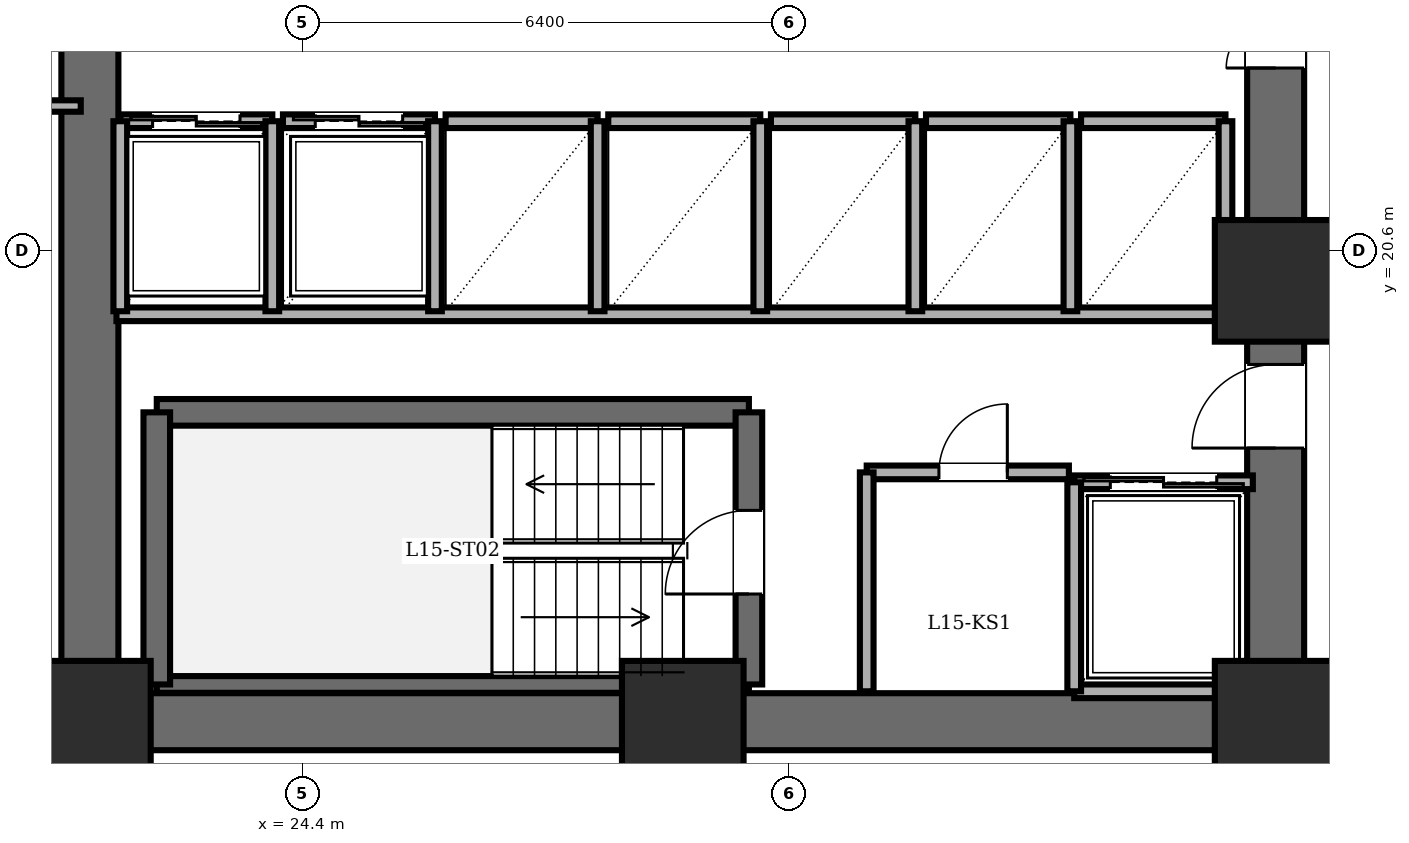
"""IFC4 building model, lengths in metres.
Left out: names, types, materials, properties, quantities, classifications, styles, units other than length and angle.
Written with IfcOpenShell. Run it as: python <this file> out.ifc"""

import sys

from ifc_helpers import new_model, si_unit, direction, frame, frame_2d, origin, origin_2d, place, context, subcontext, project, spatial, rectangle, extrude, element, fill, save


model = new_model("IFC4")
c1 = context("Model", 3, precision=1e-05, world=origin(), true_north=direction((0.0, 1.0)))
c2 = subcontext(c1, "Body", "Model", "MODEL_VIEW")
j1 = project(units=[si_unit("LENGTHUNIT", "METRE"), si_unit("PLANEANGLEUNIT", "RADIAN")], contexts=[c1])
p1 = place(None, origin())
s1 = spatial("IfcSite", under=j1, at=p1, CompositionType="ELEMENT")
p2 = place(p1, origin())
s2 = spatial("IfcBuilding", under=s1, at=p2, CompositionType="ELEMENT")
p3 = place(p2, frame((0.0, 0.0, 57.6)))
s3 = spatial("IfcBuildingStorey", under=s2, at=p3, CompositionType="ELEMENT", Elevation=57.6)
for number, where, z_axis, x_axis in (
    (1, (21.6, 14.4, 0.0), (0.0, 0.0, 1.0), (1.0, 0.0, 0.0)),
    (2, (29.4, 14.4, 0.0), (0.0, 0.0, 1.0), (1.0, 0.0, 0.0)),
    (3, (37.2, 14.4, 0.0), (0.0, 0.0, 1.0), (1.0, 0.0, 0.0)),
    (4, (37.2, 20.2, 0.0), (0.0, 0.0, 1.0), (1.0, 0.0, 0.0)),
):
    element("IfcColumn", number, at=place(p3, frame(where, z_axis=z_axis, x_axis=x_axis)), inside=s3, PredefinedType="COLUMN", context=c2, shape_type="SweptSolid", body=[
        extrude(rectangle(XDim=1.6, YDim=1.6, at=origin_2d()), origin(), (0.0, 0.0, 1.0), 3.6),
    ])
p4 = place(p3, frame((21.6, 14.4, 0.0), z_axis=(0.0, 0.0, 1.0), x_axis=(0.0, 1.0, 0.0)))
e5 = element("IfcWall", 5, at=p4, inside=s3, PredefinedType="SHEAR", context=c2, shape_type="SweptSolid", body=[
    extrude(rectangle(XDim=19.2, YDim=0.75, at=frame_2d((9.6, 0.0))), origin(), (0.0, 0.0, 1.0), 3.4),
])
p5 = place(p3, frame((37.2, 14.4, 0.0), z_axis=(0.0, 0.0, 1.0), x_axis=(-1.0, 0.0, 0.0)))
e6 = element("IfcWall", 6, at=p5, inside=s3, PredefinedType="SHEAR", context=c2, shape_type="SweptSolid", body=[
    extrude(rectangle(XDim=15.6, YDim=0.75, at=frame_2d((7.8, 0.0))), origin(), (0.0, 0.0, 1.0), 3.4),
])
p6 = place(p3, frame((37.2, 14.4, 0.0), z_axis=(0.0, 0.0, 1.0), x_axis=(0.0, 1.0, 0.0)))
e7 = element("IfcWall", 7, at=p6, inside=s3, PredefinedType="SHEAR", context=c2, shape_type="SweptSolid", body=[
    extrude(rectangle(XDim=19.2, YDim=0.75, at=frame_2d((9.6, 0.0))), origin(), (0.0, 0.0, 1.0), 3.4),
])
p7 = place(p6, frame((15.8, 0.0, 0.0)))
e8 = element("IfcOpeningElement", 8, at=p7, cuts=e7, PredefinedType="OPENING", context=c2, shape_type="SweptSolid", body=[
    extrude(rectangle(XDim=1.15, YDim=2.15, at=frame_2d((0.575, 1.075))), frame((0.0, 0.385, 0.0), z_axis=(0.0, -1.0, 0.0), x_axis=(1.0, 0.0, 0.0)), (0.0, 0.0, 1.0), 0.77),
])
p8 = place(p6, frame((3.6, 0.0, 0.0)))
e9 = element("IfcOpeningElement", 9, at=p8, cuts=e7, PredefinedType="OPENING", context=c2, shape_type="SweptSolid", body=[
    extrude(rectangle(XDim=1.1, YDim=2.15, at=frame_2d((0.55, 1.075))), frame((0.0, 0.385, 0.0), z_axis=(0.0, -1.0, 0.0), x_axis=(1.0, 0.0, 0.0)), (0.0, 0.0, 1.0), 0.77),
])
p9 = place(p6, frame((8.6, 0.0, 0.0)))
e10 = element("IfcOpeningElement", 10, at=p9, cuts=e7, PredefinedType="OPENING", context=c2, shape_type="SweptSolid", body=[
    extrude(rectangle(XDim=1.3, YDim=2.2, at=frame_2d((0.65, 1.1))), frame((0.0, 0.385, 0.0), z_axis=(0.0, -1.0, 0.0), x_axis=(1.0, 0.0, 0.0)), (0.0, 0.0, 1.0), 0.77),
])
p10 = place(p3, frame((22.48, 18.47, 0.0), z_axis=(0.0, 0.0, 1.0), x_axis=(1.0, 0.0, 0.0)))
e11 = element("IfcWall", 11, at=p10, inside=s3, PredefinedType="SOLIDWALL", context=c2, shape_type="SweptSolid", body=[
    extrude(rectangle(XDim=7.79, YDim=0.35, at=frame_2d((3.895, 0.0))), origin(), (0.0, 0.0, 1.0), 3.4),
])
p11 = place(p3, frame((22.48, 14.89, 0.0), z_axis=(0.0, 0.0, 1.0), x_axis=(1.0, 0.0, 0.0)))
e12 = element("IfcWall", 12, at=p11, inside=s3, PredefinedType="PARTITIONING", context=c2, shape_type="SweptSolid", body=[
    extrude(rectangle(XDim=7.79, YDim=0.22, at=frame_2d((3.895, 0.0))), origin(), (0.0, 0.0, 1.0), 3.4),
])
p12 = place(p3, frame((22.48, 14.89, 0.0), z_axis=(0.0, 0.0, 1.0), x_axis=(0.0, 1.0, 0.0)))
e13 = element("IfcWall", 13, at=p12, inside=s3, PredefinedType="SOLIDWALL", context=c2, shape_type="SweptSolid", body=[
    extrude(rectangle(XDim=3.58, YDim=0.35, at=frame_2d((1.79, 0.0))), origin(), (0.0, 0.0, 1.0), 3.4),
])
p13 = place(p3, frame((30.27, 14.89, 0.0), z_axis=(0.0, 0.0, 1.0), x_axis=(0.0, 1.0, 0.0)))
e14 = element("IfcWall", 14, at=p13, inside=s3, PredefinedType="SOLIDWALL", context=c2, shape_type="SweptSolid", body=[
    extrude(rectangle(XDim=3.58, YDim=0.35, at=frame_2d((1.79, 0.0))), origin(), (0.0, 0.0, 1.0), 3.4),
])
p14 = place(p13, frame((1.19, 0.0, 0.0)))
e15 = element("IfcOpeningElement", 15, at=p14, cuts=e14, PredefinedType="OPENING", context=c2, shape_type="SweptSolid", body=[
    extrude(rectangle(XDim=1.1, YDim=2.15, at=frame_2d((0.55, 1.075))), frame((0.0, 0.185, 0.0), z_axis=(0.0, -1.0, 0.0), x_axis=(1.0, 0.0, 0.0)), (0.0, 0.0, 1.0), 0.37),
])
p15 = place(p3, frame((21.95, 19.76, 0.0), z_axis=(0.0, 0.0, 1.0), x_axis=(1.0, 0.0, 0.0)))
e16 = element("IfcWall", 16, at=p15, inside=s3, PredefinedType="PARTITIONING", context=c2, shape_type="SweptSolid", body=[
    extrude(rectangle(XDim=14.87, YDim=0.18, at=frame_2d((7.435, 0.0))), origin(), (0.0, 0.0, 1.0), 3.4),
])
p16 = place(p3, frame((31.82, 17.68, 0.0), z_axis=(0.0, 0.0, 1.0), x_axis=(1.0, 0.0, 0.0)))
e17 = element("IfcWall", 17, at=p16, inside=s3, PredefinedType="PARTITIONING", context=c2, shape_type="SweptSolid", body=[
    extrude(rectangle(XDim=2.66, YDim=0.18, at=frame_2d((1.33, 0.0))), origin(), (0.0, 0.0, 1.0), 3.4),
])
p17 = place(p16, frame((0.95, 0.0, 0.0)))
e18 = element("IfcOpeningElement", 18, at=p17, cuts=e17, PredefinedType="OPENING", context=c2, shape_type="SweptSolid", body=[
    extrude(rectangle(XDim=0.9, YDim=2.05, at=frame_2d((0.45, 1.025))), frame((0.0, 0.1, 0.0), z_axis=(0.0, -1.0, 0.0), x_axis=(1.0, 0.0, 0.0)), (0.0, 0.0, 1.0), 0.2),
])
p18 = place(p3, frame((31.82, 14.8, 0.0), z_axis=(0.0, 0.0, 1.0), x_axis=(0.0, 1.0, 0.0)))
e19 = element("IfcWall", 19, at=p18, inside=s3, PredefinedType="PARTITIONING", context=c2, shape_type="SweptSolid", body=[
    extrude(rectangle(XDim=2.88, YDim=0.18, at=frame_2d((1.44, 0.0))), origin(), (0.0, 0.0, 1.0), 3.4),
])
p19 = place(p3, frame((34.55, 17.55, 0.0), z_axis=(0.0, 0.0, 1.0), x_axis=(1.0, 0.0, 0.0)))
e20 = element("IfcWall", 20, at=p19, inside=s3, PredefinedType="PARTITIONING", context=c2, shape_type="SweptSolid", body=[
    extrude(rectangle(XDim=2.35, YDim=0.18, at=frame_2d((1.175, 0.0))), origin(), (0.0, 0.0, 1.0), 3.4),
])
p20 = place(p19, frame((0.475, 0.0, 0.0)))
e21 = element("IfcOpeningElement", 21, at=p20, cuts=e20, PredefinedType="OPENING", context=c2, shape_type="SweptSolid", body=[
    extrude(rectangle(XDim=1.4, YDim=2.3, at=frame_2d((0.7, 1.15))), frame((0.0, 0.1, 0.0), z_axis=(0.0, -1.0, 0.0), x_axis=(1.0, 0.0, 0.0)), (0.0, 0.0, 1.0), 0.2),
])
p21 = place(p3, frame((36.9, 14.8, 0.0), z_axis=(0.0, 0.0, 1.0), x_axis=(-1.0, 0.0, 0.0)))
e22 = element("IfcWall", 22, at=p21, inside=s3, PredefinedType="PARTITIONING", context=c2, shape_type="SweptSolid", body=[
    extrude(rectangle(XDim=2.35, YDim=0.18, at=frame_2d((1.175, 0.0))), origin(), (0.0, 0.0, 1.0), 3.4),
])
p22 = place(p3, frame((34.55, 17.55, 0.0), z_axis=(0.0, 0.0, 1.0), x_axis=(0.0, -1.0, 0.0)))
e23 = element("IfcWall", 23, at=p22, inside=s3, PredefinedType="PARTITIONING", context=c2, shape_type="SweptSolid", body=[
    extrude(rectangle(XDim=2.75, YDim=0.18, at=frame_2d((1.375, 0.0))), origin(), (0.0, 0.0, 1.0), 3.4),
])
p23 = place(p3, frame((22.0, 22.3, 0.0), z_axis=(0.0, 0.0, 1.0), x_axis=(1.0, 0.0, 0.0)))
e24 = element("IfcWall", 24, at=p23, inside=s3, PredefinedType="PARTITIONING", context=c2, shape_type="SweptSolid", body=[
    extrude(rectangle(XDim=2.0, YDim=0.18, at=frame_2d((1.0, 0.0))), origin(), (0.0, 0.0, 1.0), 3.4),
])
p24 = place(p23, frame((0.425, 0.0, 0.0)))
e25 = element("IfcOpeningElement", 25, at=p24, cuts=e24, PredefinedType="OPENING", context=c2, shape_type="SweptSolid", body=[
    extrude(rectangle(XDim=1.15, YDim=2.2, at=frame_2d((0.575, 1.1))), frame((0.0, 0.1, 0.0), z_axis=(0.0, -1.0, 0.0), x_axis=(1.0, 0.0, 0.0)), (0.0, 0.0, 1.0), 0.2),
])
for number, where, z_axis, x_axis in (
    (26, (24.0, 19.8, 0.0), (0.0, 0.0, 1.0), (0.0, 1.0, 0.0)),
    (27, (22.0, 22.3, 0.0), (0.0, 0.0, 1.0), (0.0, -1.0, 0.0)),
):
    element("IfcWall", number, at=place(p3, frame(where, z_axis=z_axis, x_axis=x_axis)), inside=s3, PredefinedType="PARTITIONING", context=c2, shape_type="SweptSolid", body=[
        extrude(rectangle(XDim=2.5, YDim=0.18, at=frame_2d((1.25, 0.0))), origin(), (0.0, 0.0, 1.0), 3.4),
    ])
p25 = place(p3, frame((24.14, 22.3, 0.0), z_axis=(0.0, 0.0, 1.0), x_axis=(1.0, 0.0, 0.0)))
e28 = element("IfcWall", 28, at=p25, inside=s3, PredefinedType="PARTITIONING", context=c2, shape_type="SweptSolid", body=[
    extrude(rectangle(XDim=2.0, YDim=0.18, at=frame_2d((1.0, 0.0))), origin(), (0.0, 0.0, 1.0), 3.4),
])
p26 = place(p25, frame((0.425, 0.0, 0.0)))
e29 = element("IfcOpeningElement", 29, at=p26, cuts=e28, PredefinedType="OPENING", context=c2, shape_type="SweptSolid", body=[
    extrude(rectangle(XDim=1.15, YDim=2.2, at=frame_2d((0.575, 1.1))), frame((0.0, 0.1, 0.0), z_axis=(0.0, -1.0, 0.0), x_axis=(1.0, 0.0, 0.0)), (0.0, 0.0, 1.0), 0.2),
])
p27 = place(p3, frame((26.14, 19.8, 0.0), z_axis=(0.0, 0.0, 1.0), x_axis=(0.0, 1.0, 0.0)))
e30 = element("IfcWall", 30, at=p27, inside=s3, PredefinedType="PARTITIONING", context=c2, shape_type="SweptSolid", body=[
    extrude(rectangle(XDim=2.5, YDim=0.18, at=frame_2d((1.25, 0.0))), origin(), (0.0, 0.0, 1.0), 3.4),
])
p28 = place(p3, frame((26.28, 22.3, 0.0), z_axis=(0.0, 0.0, 1.0), x_axis=(1.0, 0.0, 0.0)))
e31 = element("IfcWall", 31, at=p28, inside=s3, PredefinedType="PARTITIONING", context=c2, shape_type="SweptSolid", body=[
    extrude(rectangle(XDim=2.0, YDim=0.18, at=frame_2d((1.0, 0.0))), origin(), (0.0, 0.0, 1.0), 3.4),
])
p29 = place(p3, frame((28.28, 19.8, 0.0), z_axis=(0.0, 0.0, 1.0), x_axis=(0.0, 1.0, 0.0)))
e32 = element("IfcWall", 32, at=p29, inside=s3, PredefinedType="PARTITIONING", context=c2, shape_type="SweptSolid", body=[
    extrude(rectangle(XDim=2.5, YDim=0.18, at=frame_2d((1.25, 0.0))), origin(), (0.0, 0.0, 1.0), 3.4),
])
p30 = place(p3, frame((28.42, 22.3, 0.0), z_axis=(0.0, 0.0, 1.0), x_axis=(1.0, 0.0, 0.0)))
e33 = element("IfcWall", 33, at=p30, inside=s3, PredefinedType="PARTITIONING", context=c2, shape_type="SweptSolid", body=[
    extrude(rectangle(XDim=2.0, YDim=0.18, at=frame_2d((1.0, 0.0))), origin(), (0.0, 0.0, 1.0), 3.4),
])
p31 = place(p3, frame((30.42, 19.8, 0.0), z_axis=(0.0, 0.0, 1.0), x_axis=(0.0, 1.0, 0.0)))
e34 = element("IfcWall", 34, at=p31, inside=s3, PredefinedType="PARTITIONING", context=c2, shape_type="SweptSolid", body=[
    extrude(rectangle(XDim=2.5, YDim=0.18, at=frame_2d((1.25, 0.0))), origin(), (0.0, 0.0, 1.0), 3.4),
])
p32 = place(p3, frame((30.56, 22.3, 0.0), z_axis=(0.0, 0.0, 1.0), x_axis=(1.0, 0.0, 0.0)))
e35 = element("IfcWall", 35, at=p32, inside=s3, PredefinedType="PARTITIONING", context=c2, shape_type="SweptSolid", body=[
    extrude(rectangle(XDim=1.9, YDim=0.18, at=frame_2d((0.95, 0.0))), origin(), (0.0, 0.0, 1.0), 3.4),
])
p33 = place(p3, frame((32.46, 19.8, 0.0), z_axis=(0.0, 0.0, 1.0), x_axis=(0.0, 1.0, 0.0)))
e36 = element("IfcWall", 36, at=p33, inside=s3, PredefinedType="PARTITIONING", context=c2, shape_type="SweptSolid", body=[
    extrude(rectangle(XDim=2.5, YDim=0.18, at=frame_2d((1.25, 0.0))), origin(), (0.0, 0.0, 1.0), 3.4),
])
p34 = place(p3, frame((32.6, 22.3, 0.0), z_axis=(0.0, 0.0, 1.0), x_axis=(1.0, 0.0, 0.0)))
e37 = element("IfcWall", 37, at=p34, inside=s3, PredefinedType="PARTITIONING", context=c2, shape_type="SweptSolid", body=[
    extrude(rectangle(XDim=1.9, YDim=0.18, at=frame_2d((0.95, 0.0))), origin(), (0.0, 0.0, 1.0), 3.4),
])
p35 = place(p3, frame((34.5, 19.8, 0.0), z_axis=(0.0, 0.0, 1.0), x_axis=(0.0, 1.0, 0.0)))
e38 = element("IfcWall", 38, at=p35, inside=s3, PredefinedType="PARTITIONING", context=c2, shape_type="SweptSolid", body=[
    extrude(rectangle(XDim=2.5, YDim=0.18, at=frame_2d((1.25, 0.0))), origin(), (0.0, 0.0, 1.0), 3.4),
])
p36 = place(p3, frame((34.64, 22.3, 0.0), z_axis=(0.0, 0.0, 1.0), x_axis=(1.0, 0.0, 0.0)))
e39 = element("IfcWall", 39, at=p36, inside=s3, PredefinedType="PARTITIONING", context=c2, shape_type="SweptSolid", body=[
    extrude(rectangle(XDim=1.9, YDim=0.18, at=frame_2d((0.95, 0.0))), origin(), (0.0, 0.0, 1.0), 3.4),
])
p37 = place(p3, frame((36.54, 19.8, 0.0), z_axis=(0.0, 0.0, 1.0), x_axis=(0.0, 1.0, 0.0)))
e40 = element("IfcWall", 40, at=p37, inside=s3, PredefinedType="PARTITIONING", context=c2, shape_type="SweptSolid", body=[
    extrude(rectangle(XDim=2.5, YDim=0.18, at=frame_2d((1.25, 0.0))), origin(), (0.0, 0.0, 1.0), 3.4),
])
p38 = place(p3, frame((3.4, 14.18, 0.0), z_axis=(0.0, 0.0, 1.0), x_axis=(1.0, 0.0, 0.0)))
e41 = element("IfcWall", 41, at=p38, inside=s3, PredefinedType="PARTITIONING", context=c2, shape_type="SweptSolid", body=[
    extrude(rectangle(XDim=18.08, YDim=0.15, at=frame_2d((9.04, 0.0))), origin(), (0.0, 0.0, 1.0), 3.4),
])
p39 = place(p38, frame((9.58, 0.0, 0.0)))
e42 = element("IfcOpeningElement", 42, at=p39, cuts=e41, PredefinedType="OPENING", context=c2, shape_type="SweptSolid", body=[
    extrude(rectangle(XDim=1.0, YDim=2.15, at=frame_2d((0.5, 1.075))), frame((0.0, 0.085, 0.0), z_axis=(0.0, -1.0, 0.0), x_axis=(1.0, 0.0, 0.0)), (0.0, 0.0, 1.0), 0.17),
])
p40 = place(p3, frame((3.4, 22.5, 0.0), z_axis=(0.0, 0.0, 1.0), x_axis=(1.0, 0.0, 0.0)))
e43 = element("IfcWall", 43, at=p40, inside=s3, PredefinedType="PARTITIONING", context=c2, shape_type="SweptSolid", body=[
    extrude(rectangle(XDim=18.08, YDim=0.15, at=frame_2d((9.04, 0.0))), origin(), (0.0, 0.0, 1.0), 3.4),
])
p41 = place(p14, origin())
e44 = element("IfcDoor", 44, at=p41, inside=s3, OperationType="SINGLE_SWING_LEFT", PredefinedType="DOOR", context=c2, shape_type="SweptSolid", body=[
    extrude(rectangle(XDim=1.1, YDim=2.15, at=frame_2d((0.55, 1.075))), frame((0.0, 0.025, 0.0), z_axis=(0.0, -1.0, 0.0), x_axis=(1.0, 0.0, 0.0)), (0.0, 0.0, 1.0), 0.05),
])
fill(e15, e44)
p42 = place(p8, origin())
e45 = element("IfcDoor", 45, at=p42, inside=s3, OperationType="SINGLE_SWING_LEFT", PredefinedType="DOOR", context=c2, shape_type="SweptSolid", body=[
    extrude(rectangle(XDim=1.1, YDim=2.15, at=frame_2d((0.55, 1.075))), frame((0.0, 0.025, 0.0), z_axis=(0.0, -1.0, 0.0), x_axis=(1.0, 0.0, 0.0)), (0.0, 0.0, 1.0), 0.05),
])
fill(e9, e45)
p43 = place(p17, origin())
e46 = element("IfcDoor", 46, at=p43, inside=s3, OperationType="SINGLE_SWING_RIGHT", PredefinedType="DOOR", context=c2, shape_type="SweptSolid", body=[
    extrude(rectangle(XDim=0.9, YDim=2.05, at=frame_2d((0.45, 1.025))), frame((0.0, 0.025, 0.0), z_axis=(0.0, -1.0, 0.0), x_axis=(1.0, 0.0, 0.0)), (0.0, 0.0, 1.0), 0.05),
])
fill(e18, e46)
p44 = place(p20, origin())
e47 = element("IfcDoor", 47, at=p44, inside=s3, OperationType="DOUBLE_DOOR_SLIDING", PredefinedType="DOOR", context=c2, shape_type="SweptSolid", body=[
    extrude(rectangle(XDim=1.4, YDim=2.3, at=frame_2d((0.7, 1.15))), frame((0.0, 0.025, 0.0), z_axis=(0.0, -1.0, 0.0), x_axis=(1.0, 0.0, 0.0)), (0.0, 0.0, 1.0), 0.05),
])
fill(e21, e47)
p45 = place(p24, origin())
e48 = element("IfcDoor", 48, at=p45, inside=s3, OperationType="DOUBLE_DOOR_SLIDING", PredefinedType="DOOR", context=c2, shape_type="SweptSolid", body=[
    extrude(rectangle(XDim=1.15, YDim=2.2, at=frame_2d((0.575, 1.1))), frame((0.0, 0.025, 0.0), z_axis=(0.0, -1.0, 0.0), x_axis=(1.0, 0.0, 0.0)), (0.0, 0.0, 1.0), 0.05),
])
fill(e25, e48)
p46 = place(p26, origin())
e49 = element("IfcDoor", 49, at=p46, inside=s3, OperationType="DOUBLE_DOOR_SLIDING", PredefinedType="DOOR", context=c2, shape_type="SweptSolid", body=[
    extrude(rectangle(XDim=1.15, YDim=2.2, at=frame_2d((0.575, 1.1))), frame((0.0, 0.025, 0.0), z_axis=(0.0, -1.0, 0.0), x_axis=(1.0, 0.0, 0.0)), (0.0, 0.0, 1.0), 0.05),
])
fill(e29, e49)
p47 = place(p9, origin())
e50 = element("IfcDoor", 50, at=p47, inside=s3, OperationType="DOUBLE_DOOR_SINGLE_SWING", PredefinedType="DOOR", context=c2, shape_type="SweptSolid", body=[
    extrude(rectangle(XDim=1.3, YDim=2.2, at=frame_2d((0.65, 1.1))), frame((0.0, 0.025, 0.0), z_axis=(0.0, -1.0, 0.0), x_axis=(1.0, 0.0, 0.0)), (0.0, 0.0, 1.0), 0.05),
])
fill(e10, e50)
save(model, sys.argv[1])
